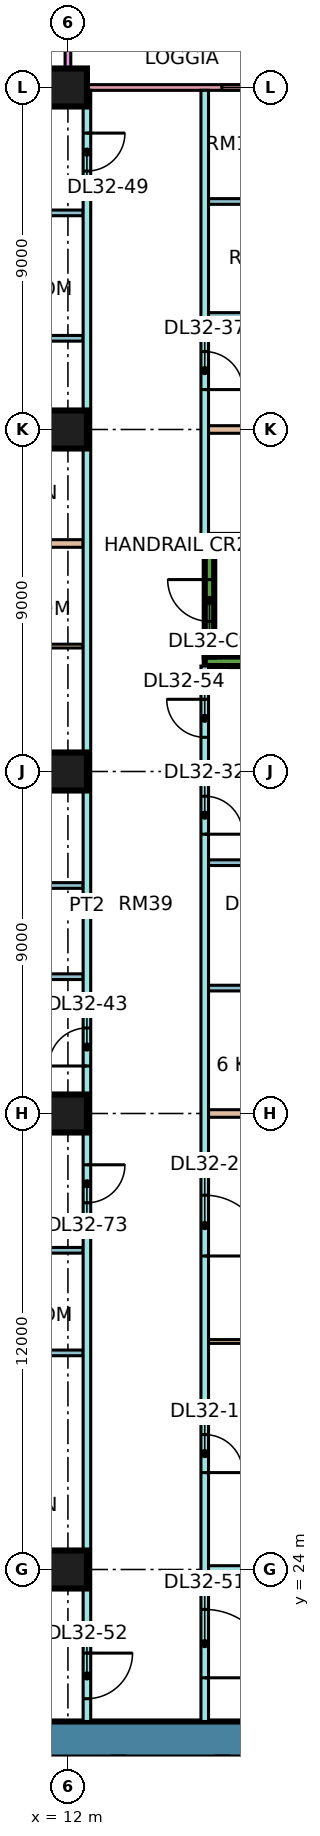
"""IFC4 building model, lengths in metres.
Left out: names, types, materials, properties, quantities, classifications, styles, units other than length and angle.
Written with IfcOpenShell. Run it as: python <this file> out.ifc"""

import sys

from ifc_helpers import new_model, si_unit, direction, frame, frame_2d, origin, origin_2d, place, context, subcontext, project, spatial, rectangle, extrude, element, fill, save


model = new_model("IFC4")
c1 = context("Model", 3, precision=1e-05, world=origin(), true_north=direction((0.0, 1.0)))
c2 = subcontext(c1, "Body", "Model", "MODEL_VIEW")
j1 = project(units=[si_unit("LENGTHUNIT", "METRE"), si_unit("PLANEANGLEUNIT", "RADIAN")], contexts=[c1])
p1 = place(None, origin())
s1 = spatial("IfcSite", under=j1, at=p1, CompositionType="ELEMENT")
p2 = place(p1, origin())
s2 = spatial("IfcBuilding", under=s1, at=p2, CompositionType="ELEMENT")
p3 = place(p2, frame((0.0, 0.0, 136.9)))
s3 = spatial("IfcBuildingStorey", under=s2, at=p3, CompositionType="ELEMENT", Elevation=136.9)
for number, where, z_axis, x_axis in (
    (1, (12.0, 24.0, 0.0), (0.0, 0.0, 1.0), (1.0, 0.0, 0.0)),
    (2, (12.0, 36.0, 0.0), (0.0, 0.0, 1.0), (1.0, 0.0, 0.0)),
    (3, (12.0, 45.0, 0.0), (0.0, 0.0, 1.0), (1.0, 0.0, 0.0)),
    (4, (12.0, 54.0, 0.0), (0.0, 0.0, 1.0), (1.0, 0.0, 0.0)),
    (5, (12.0, 63.0, 0.0), (0.0, 0.0, 1.0), (1.0, 0.0, 0.0)),
):
    element("IfcColumn", number, at=place(p3, frame(where, z_axis=z_axis, x_axis=x_axis)), inside=s3, PredefinedType="COLUMN", context=c2, shape_type="SweptSolid", body=[
        extrude(rectangle(XDim=1.0, YDim=1.0, at=origin_2d()), origin(), (0.0, 0.0, 1.0), 3.75),
    ])
p4 = place(p3, frame((9.0, 19.525, 0.0), z_axis=(0.0, 0.0, 1.0), x_axis=(1.0, 0.0, 0.0)))
e6 = element("IfcWall", 6, at=p4, inside=s3, PredefinedType="SHEAR", context=c2, shape_type="SweptSolid", body=[
    extrude(rectangle(XDim=25.0, YDim=0.95, at=frame_2d((12.5, 0.0))), origin(), (0.0, 0.0, 1.0), 3.75),
])
p5 = place(p4, frame((19.1, 0.0, 0.0)))
e7 = element("IfcOpeningElement", 7, at=p5, cuts=e6, PredefinedType="OPENING", context=c2, shape_type="SweptSolid", body=[
    extrude(rectangle(XDim=1.8, YDim=2.4, at=frame_2d((0.9, 1.2))), frame((0.0, 0.485, 0.0), z_axis=(0.0, -1.0, 0.0), x_axis=(1.0, 0.0, 0.0)), (0.0, 0.0, 1.0), 0.97),
])
for number, where, z_axis, x_axis in (
    (8, (15.6, 47.9, 0.0), (0.0, 0.0, 1.0), (1.0, 0.0, 0.0)),
    (9, (15.6, 51.1, 0.0), (0.0, 0.0, 1.0), (1.0, 0.0, 0.0)),
):
    element("IfcWall", number, at=place(p3, frame(where, z_axis=z_axis, x_axis=x_axis)), inside=s3, PredefinedType="SHEAR", context=c2, shape_type="SweptSolid", body=[
        extrude(rectangle(XDim=7.0, YDim=0.25, at=frame_2d((3.5, 0.0))), origin(), (0.0, 0.0, 1.0), 3.75),
    ])
p6 = place(p3, frame((15.725, 48.025, 0.0), z_axis=(0.0, 0.0, 1.0), x_axis=(0.0, 1.0, 0.0)))
e10 = element("IfcWall", 10, at=p6, inside=s3, PredefinedType="SHEAR", context=c2, shape_type="SweptSolid", body=[
    extrude(rectangle(XDim=2.95, YDim=0.25, at=frame_2d((1.475, 0.0))), origin(), (0.0, 0.0, 1.0), 3.75),
])
p7 = place(p6, frame((0.925, 0.0, 0.0)))
e11 = element("IfcOpeningElement", 11, at=p7, cuts=e10, PredefinedType="OPENING", context=c2, shape_type="SweptSolid", body=[
    extrude(rectangle(XDim=1.1, YDim=2.2, at=frame_2d((0.55, 1.1))), frame((0.0, 0.135, 0.0), z_axis=(0.0, -1.0, 0.0), x_axis=(1.0, 0.0, 0.0)), (0.0, 0.0, 1.0), 0.27),
])
p8 = place(p3, frame((22.425, 63.0, 0.0), z_axis=(0.0, 0.0, 1.0), x_axis=(-1.0, 0.0, 0.0)))
e12 = element("IfcWall", 12, at=p8, inside=s3, PredefinedType="SOLIDWALL", context=c2, shape_type="SweptSolid", body=[
    extrude(rectangle(XDim=10.35, YDim=0.15, at=frame_2d((5.175, 0.0))), origin(), (0.0, 0.0, 1.0), 3.3),
])
p9 = place(p8, frame((0.562, 0.0, 0.45)))
e13 = element("IfcOpeningElement", 13, at=p9, cuts=e12, PredefinedType="OPENING", context=c2, shape_type="SweptSolid", body=[
    extrude(rectangle(XDim=1.8, YDim=2.4, at=frame_2d((0.9, 1.2))), frame((0.0, 0.085, 0.0), z_axis=(0.0, -1.0, 0.0), x_axis=(1.0, 0.0, 0.0)), (0.0, 0.0, 1.0), 0.17),
])
p10 = place(p8, frame((4.575, 0.0, 0.45)))
e14 = element("IfcOpeningElement", 14, at=p10, cuts=e12, PredefinedType="OPENING", context=c2, shape_type="SweptSolid", body=[
    extrude(rectangle(XDim=1.8, YDim=2.4, at=frame_2d((0.9, 1.2))), frame((0.0, 0.085, 0.0), z_axis=(0.0, -1.0, 0.0), x_axis=(1.0, 0.0, 0.0)), (0.0, 0.0, 1.0), 0.17),
])
p11 = place(p3, frame((12.0, 64.5, 0.0), z_axis=(0.0, 0.0, 1.0), x_axis=(0.0, -1.0, 0.0)))
e15 = element("IfcWall", 15, at=p11, inside=s3, PredefinedType="SOLIDWALL", context=c2, shape_type="SweptSolid", body=[
    extrude(rectangle(XDim=1.5, YDim=0.15, at=frame_2d((0.75, 0.0))), origin(), (0.0, 0.0, 1.0), 3.3),
])
p12 = place(p3, frame((0.0, 36.0, 0.0), z_axis=(0.0, 0.0, 1.0), x_axis=(1.0, 0.0, 0.0)))
e16 = element("IfcWall", 16, at=p12, inside=s3, PredefinedType="PARTITIONING", context=c2, shape_type="SweptSolid", body=[
    extrude(rectangle(XDim=12.4, YDim=0.2, at=frame_2d((6.2, 0.0))), origin(), (0.0, 0.0, 1.0), 3.3),
])
p13 = place(p3, frame((-1.35, 51.0, 0.0), z_axis=(0.0, 0.0, 1.0), x_axis=(1.0, 0.0, 0.0)))
e17 = element("IfcWall", 17, at=p13, inside=s3, PredefinedType="PARTITIONING", context=c2, shape_type="SweptSolid", body=[
    extrude(rectangle(XDim=13.75, YDim=0.2, at=frame_2d((6.875, 0.0))), origin(), (0.0, 0.0, 1.0), 3.3),
])
p14 = place(p3, frame((0.074, 22.4, 0.0), z_axis=(0.0, 0.0, 1.0), x_axis=(1.0, 0.0, 0.0)))
e18 = element("IfcWall", 18, at=p14, inside=s3, PredefinedType="PARTITIONING", context=c2, shape_type="SweptSolid", body=[
    extrude(rectangle(XDim=12.326, YDim=0.2, at=frame_2d((6.163, 0.0))), origin(), (0.0, 0.0, 1.0), 3.3),
])
for number, where, z_axis, x_axis in (
    (19, (7.775, 39.6, 0.0), (0.0, 0.0, 1.0), (1.0, 0.0, 0.0)),
    (20, (7.775, 42.0, 0.0), (0.0, 0.0, 1.0), (1.0, 0.0, 0.0)),
):
    element("IfcWall", number, at=place(p3, frame(where, z_axis=z_axis, x_axis=x_axis)), inside=s3, PredefinedType="PARTITIONING", context=c2, shape_type="SweptSolid", body=[
        extrude(rectangle(XDim=4.625, YDim=0.15, at=frame_2d((2.312, 0.0))), origin(), (0.0, 0.0, 1.0), 3.3),
    ])
p15 = place(p3, frame((7.775, 48.3, 0.0), z_axis=(0.0, 0.0, 1.0), x_axis=(1.0, 0.0, 0.0)))
e21 = element("IfcWall", 21, at=p15, inside=s3, PredefinedType="PARTITIONING", context=c2, shape_type="SweptSolid", body=[
    extrude(rectangle(XDim=4.625, YDim=0.1, at=frame_2d((2.312, 0.0))), origin(), (0.0, 0.0, 1.0), 3.3),
])
for number, where, z_axis, x_axis in (
    (22, (8.375, 29.7, 0.0), (0.0, 0.0, 1.0), (1.0, 0.0, 0.0)),
    (23, (8.375, 32.4, 0.0), (0.0, 0.0, 1.0), (1.0, 0.0, 0.0)),
    (24, (8.375, 56.4, 0.0), (0.0, 0.0, 1.0), (1.0, 0.0, 0.0)),
):
    element("IfcWall", number, at=place(p3, frame(where, z_axis=z_axis, x_axis=x_axis)), inside=s3, PredefinedType="PARTITIONING", context=c2, shape_type="SweptSolid", body=[
        extrude(rectangle(XDim=4.025, YDim=0.15, at=frame_2d((2.012, 0.0))), origin(), (0.0, 0.0, 1.0), 3.3),
    ])
p16 = place(p3, frame((8.375, 59.7, 0.0), z_axis=(0.0, 0.0, 1.0), x_axis=(1.0, 0.0, 0.0)))
e25 = element("IfcWall", 25, at=p16, inside=s3, PredefinedType="PARTITIONING", context=c2, shape_type="SweptSolid", body=[
    extrude(rectangle(XDim=4.025, YDim=0.15, at=frame_2d((2.012, 0.0))), origin(), (0.0, 0.0, 1.0), 3.3),
])
p17 = place(p16, frame((1.575, 0.0, 0.0)))
e26 = element("IfcOpeningElement", 26, at=p17, cuts=e25, PredefinedType="OPENING", context=c2, shape_type="SweptSolid", body=[
    extrude(rectangle(XDim=0.8, YDim=2.1, at=frame_2d((0.4, 1.05))), frame((0.0, 0.085, 0.0), z_axis=(0.0, -1.0, 0.0), x_axis=(1.0, 0.0, 0.0)), (0.0, 0.0, 1.0), 0.17),
])
p18 = place(p3, frame((12.5, 20.0, 0.0), z_axis=(0.0, 0.0, 1.0), x_axis=(0.0, 1.0, 0.0)))
e27 = element("IfcWall", 27, at=p18, inside=s3, PredefinedType="PARTITIONING", context=c2, shape_type="SweptSolid", body=[
    extrude(rectangle(XDim=42.926, YDim=0.2, at=frame_2d((21.463, 0.0))), origin(), (0.0, 0.0, 1.0), 3.3),
])
p19 = place(p18, frame((17.25, 0.0, 0.0)))
e28 = element("IfcOpeningElement", 28, at=p19, cuts=e27, PredefinedType="OPENING", context=c2, shape_type="SweptSolid", body=[
    extrude(rectangle(XDim=1.0, YDim=2.1, at=frame_2d((0.5, 1.05))), frame((0.0, 0.11, 0.0), z_axis=(0.0, -1.0, 0.0), x_axis=(1.0, 0.0, 0.0)), (0.0, 0.0, 1.0), 0.22),
])
p20 = place(p18, frame((40.8, 0.0, 0.0)))
e29 = element("IfcOpeningElement", 29, at=p20, cuts=e27, PredefinedType="OPENING", context=c2, shape_type="SweptSolid", body=[
    extrude(rectangle(XDim=1.0, YDim=2.1, at=frame_2d((0.5, 1.05))), frame((0.0, 0.11, 0.0), z_axis=(0.0, -1.0, 0.0), x_axis=(1.0, 0.0, 0.0)), (0.0, 0.0, 1.0), 0.22),
])
p21 = place(p18, frame((0.6, 0.0, 0.0)))
e30 = element("IfcOpeningElement", 30, at=p21, cuts=e27, PredefinedType="OPENING", context=c2, shape_type="SweptSolid", body=[
    extrude(rectangle(XDim=1.2, YDim=2.1, at=frame_2d((0.6, 1.05))), frame((0.0, 0.11, 0.0), z_axis=(0.0, -1.0, 0.0), x_axis=(1.0, 0.0, 0.0)), (0.0, 0.0, 1.0), 0.22),
])
p22 = place(p18, frame((13.65, 0.0, 0.0)))
e31 = element("IfcOpeningElement", 31, at=p22, cuts=e27, PredefinedType="OPENING", context=c2, shape_type="SweptSolid", body=[
    extrude(rectangle(XDim=1.0, YDim=2.1, at=frame_2d((0.5, 1.05))), frame((0.0, 0.11, 0.0), z_axis=(0.0, -1.0, 0.0), x_axis=(1.0, 0.0, 0.0)), (0.0, 0.0, 1.0), 0.22),
])
p23 = place(p3, frame((15.6, 20.0, 0.0), z_axis=(0.0, 0.0, 1.0), x_axis=(0.0, 1.0, 0.0)))
e32 = element("IfcWall", 32, at=p23, inside=s3, PredefinedType="PARTITIONING", context=c2, shape_type="SweptSolid", body=[
    extrude(rectangle(XDim=27.775, YDim=0.2, at=frame_2d((13.887, 0.0))), origin(), (0.0, 0.0, 1.0), 3.3),
])
p24 = place(p23, frame((6.55, 0.0, 0.0)))
e33 = element("IfcOpeningElement", 33, at=p24, cuts=e32, PredefinedType="OPENING", context=c2, shape_type="SweptSolid", body=[
    extrude(rectangle(XDim=1.0, YDim=2.1, at=frame_2d((0.5, 1.05))), frame((0.0, 0.11, 0.0), z_axis=(0.0, -1.0, 0.0), x_axis=(1.0, 0.0, 0.0)), (0.0, 0.0, 1.0), 0.22),
])
p25 = place(p23, frame((12.25, 0.0, 0.0)))
e34 = element("IfcOpeningElement", 34, at=p25, cuts=e32, PredefinedType="OPENING", context=c2, shape_type="SweptSolid", body=[
    extrude(rectangle(XDim=1.6, YDim=2.1, at=frame_2d((0.8, 1.05))), frame((0.0, 0.11, 0.0), z_axis=(0.0, -1.0, 0.0), x_axis=(1.0, 0.0, 0.0)), (0.0, 0.0, 1.0), 0.22),
])
p26 = place(p23, frame((23.35, 0.0, 0.0)))
e35 = element("IfcOpeningElement", 35, at=p26, cuts=e32, PredefinedType="OPENING", context=c2, shape_type="SweptSolid", body=[
    extrude(rectangle(XDim=1.0, YDim=2.1, at=frame_2d((0.5, 1.05))), frame((0.0, 0.11, 0.0), z_axis=(0.0, -1.0, 0.0), x_axis=(1.0, 0.0, 0.0)), (0.0, 0.0, 1.0), 0.22),
])
p27 = place(p23, frame((1.15, 0.0, 0.0)))
e36 = element("IfcOpeningElement", 36, at=p27, cuts=e32, PredefinedType="OPENING", context=c2, shape_type="SweptSolid", body=[
    extrude(rectangle(XDim=1.8, YDim=2.1, at=frame_2d((0.9, 1.05))), frame((0.0, 0.11, 0.0), z_axis=(0.0, -1.0, 0.0), x_axis=(1.0, 0.0, 0.0)), (0.0, 0.0, 1.0), 0.22),
])
p28 = place(p23, frame((25.9, 0.0, 0.0)))
e37 = element("IfcOpeningElement", 37, at=p28, cuts=e32, PredefinedType="OPENING", context=c2, shape_type="SweptSolid", body=[
    extrude(rectangle(XDim=1.0, YDim=2.1, at=frame_2d((0.5, 1.05))), frame((0.0, 0.11, 0.0), z_axis=(0.0, -1.0, 0.0), x_axis=(1.0, 0.0, 0.0)), (0.0, 0.0, 1.0), 0.22),
])
p29 = place(p3, frame((15.6, 51.225, 0.0), z_axis=(0.0, 0.0, 1.0), x_axis=(0.0, 1.0, 0.0)))
e38 = element("IfcWall", 38, at=p29, inside=s3, PredefinedType="PARTITIONING", context=c2, shape_type="SweptSolid", body=[
    extrude(rectangle(XDim=11.701, YDim=0.2, at=frame_2d((5.851, 0.0))), origin(), (0.0, 0.0, 1.0), 3.3),
])
p30 = place(p29, frame((3.825, 0.0, 0.0)))
e39 = element("IfcOpeningElement", 39, at=p30, cuts=e38, PredefinedType="OPENING", context=c2, shape_type="SweptSolid", body=[
    extrude(rectangle(XDim=1.0, YDim=2.1, at=frame_2d((0.5, 1.05))), frame((0.0, 0.11, 0.0), z_axis=(0.0, -1.0, 0.0), x_axis=(1.0, 0.0, 0.0)), (0.0, 0.0, 1.0), 0.22),
])
p31 = place(p3, frame((15.7, 24.0, 0.0), z_axis=(0.0, 0.0, 1.0), x_axis=(1.0, 0.0, 0.0)))
e40 = element("IfcWall", 40, at=p31, inside=s3, PredefinedType="PARTITIONING", context=c2, shape_type="SweptSolid", body=[
    extrude(rectangle(XDim=5.8, YDim=0.2, at=frame_2d((2.9, 0.0))), origin(), (0.0, 0.0, 1.0), 3.3),
])
p32 = place(p3, frame((15.7, 30.0, 0.0), z_axis=(0.0, 0.0, 1.0), x_axis=(1.0, 0.0, 0.0)))
e41 = element("IfcWall", 41, at=p32, inside=s3, PredefinedType="PARTITIONING", context=c2, shape_type="SweptSolid", body=[
    extrude(rectangle(XDim=5.8, YDim=0.1, at=frame_2d((2.9, 0.0))), origin(), (0.0, 0.0, 1.0), 3.3),
])
p33 = place(p3, frame((15.7, 36.0, 0.0), z_axis=(0.0, 0.0, 1.0), x_axis=(1.0, 0.0, 0.0)))
e42 = element("IfcWall", 42, at=p33, inside=s3, PredefinedType="PARTITIONING", context=c2, shape_type="SweptSolid", body=[
    extrude(rectangle(XDim=8.3, YDim=0.2, at=frame_2d((4.15, 0.0))), origin(), (0.0, 0.0, 1.0), 3.3),
])
p34 = place(p3, frame((15.7, 39.3, 0.0), z_axis=(0.0, 0.0, 1.0), x_axis=(1.0, 0.0, 0.0)))
e43 = element("IfcWall", 43, at=p34, inside=s3, PredefinedType="PARTITIONING", context=c2, shape_type="SweptSolid", body=[
    extrude(rectangle(XDim=3.125, YDim=0.15, at=frame_2d((1.562, 0.0))), origin(), (0.0, 0.0, 1.0), 3.3),
])
p35 = place(p3, frame((15.7, 42.6, 0.0), z_axis=(0.0, 0.0, 1.0), x_axis=(1.0, 0.0, 0.0)))
e44 = element("IfcWall", 44, at=p35, inside=s3, PredefinedType="PARTITIONING", context=c2, shape_type="SweptSolid", body=[
    extrude(rectangle(XDim=3.125, YDim=0.15, at=frame_2d((1.562, 0.0))), origin(), (0.0, 0.0, 1.0), 3.3),
])
p36 = place(p35, frame((1.1, 0.0, 0.0)))
e45 = element("IfcOpeningElement", 45, at=p36, cuts=e44, PredefinedType="OPENING", context=c2, shape_type="SweptSolid", body=[
    extrude(rectangle(XDim=0.8, YDim=2.1, at=frame_2d((0.4, 1.05))), frame((0.0, 0.085, 0.0), z_axis=(0.0, -1.0, 0.0), x_axis=(1.0, 0.0, 0.0)), (0.0, 0.0, 1.0), 0.17),
])
p37 = place(p3, frame((15.7, 45.0, 0.0), z_axis=(0.0, 0.0, 1.0), x_axis=(1.0, 0.0, 0.0)))
e46 = element("IfcWall", 46, at=p37, inside=s3, PredefinedType="PARTITIONING", context=c2, shape_type="SweptSolid", body=[
    extrude(rectangle(XDim=8.226, YDim=0.2, at=frame_2d((4.113, 0.0))), origin(), (0.0, 0.0, 1.0), 3.3),
])
p38 = place(p3, frame((15.7, 54.0, 0.0), z_axis=(0.0, 0.0, 1.0), x_axis=(1.0, 0.0, 0.0)))
e47 = element("IfcWall", 47, at=p38, inside=s3, PredefinedType="PARTITIONING", context=c2, shape_type="SweptSolid", body=[
    extrude(rectangle(XDim=8.3, YDim=0.2, at=frame_2d((4.15, 0.0))), origin(), (0.0, 0.0, 1.0), 3.3),
])
for number, where, z_axis, x_axis in (
    (48, (15.7, 57.0, 0.0), (0.0, 0.0, 1.0), (1.0, 0.0, 0.0)),
    (49, (15.7, 60.0, 0.0), (0.0, 0.0, 1.0), (1.0, 0.0, 0.0)),
):
    element("IfcWall", number, at=place(p3, frame(where, z_axis=z_axis, x_axis=x_axis)), inside=s3, PredefinedType="PARTITIONING", context=c2, shape_type="SweptSolid", body=[
        extrude(rectangle(XDim=2.525, YDim=0.15, at=frame_2d((1.263, 0.0))), origin(), (0.0, 0.0, 1.0), 3.3),
    ])
p39 = place(p10, origin())
e50 = element("IfcWindow", 50, at=p39, inside=s3, PartitioningType="SINGLE_PANEL", PredefinedType="WINDOW", context=c2, shape_type="SweptSolid", body=[
    extrude(rectangle(XDim=1.8, YDim=2.4, at=frame_2d((0.9, 1.2))), frame((0.0, 0.03, 0.0), z_axis=(0.0, -1.0, 0.0), x_axis=(1.0, 0.0, 0.0)), (0.0, 0.0, 1.0), 0.06),
])
fill(e14, e50)
p40 = place(p7, frame((1.1, 0.0, 0.0), z_axis=(0.0, 0.0, 1.0), x_axis=(-1.0, 0.0, 0.0)))
e51 = element("IfcDoor", 51, at=p40, inside=s3, OperationType="SINGLE_SWING_RIGHT", PredefinedType="DOOR", context=c2, shape_type="SweptSolid", body=[
    extrude(rectangle(XDim=1.1, YDim=2.2, at=frame_2d((0.55, 1.1))), frame((0.0, 0.025, 0.0), z_axis=(0.0, -1.0, 0.0), x_axis=(1.0, 0.0, 0.0)), (0.0, 0.0, 1.0), 0.05),
])
fill(e11, e51)
p41 = place(p24, frame((1.0, 0.0, 0.0), z_axis=(0.0, 0.0, 1.0), x_axis=(-1.0, 0.0, 0.0)))
e52 = element("IfcDoor", 52, at=p41, inside=s3, OperationType="SINGLE_SWING_LEFT", PredefinedType="DOOR", context=c2, shape_type="SweptSolid", body=[
    extrude(rectangle(XDim=1.0, YDim=2.1, at=frame_2d((0.5, 1.05))), frame((0.0, 0.025, 0.0), z_axis=(0.0, -1.0, 0.0), x_axis=(1.0, 0.0, 0.0)), (0.0, 0.0, 1.0), 0.05),
])
fill(e33, e52)
p42 = place(p25, frame((1.6, 0.0, 0.0), z_axis=(0.0, 0.0, 1.0), x_axis=(-1.0, 0.0, 0.0)))
e53 = element("IfcDoor", 53, at=p42, inside=s3, OperationType="DOUBLE_DOOR_SINGLE_SWING", PredefinedType="DOOR", context=c2, shape_type="SweptSolid", body=[
    extrude(rectangle(XDim=1.6, YDim=2.1, at=frame_2d((0.8, 1.05))), frame((0.0, 0.025, 0.0), z_axis=(0.0, -1.0, 0.0), x_axis=(1.0, 0.0, 0.0)), (0.0, 0.0, 1.0), 0.05),
])
fill(e34, e53)
p43 = place(p26, frame((1.0, 0.0, 0.0), z_axis=(0.0, 0.0, 1.0), x_axis=(-1.0, 0.0, 0.0)))
e54 = element("IfcDoor", 54, at=p43, inside=s3, OperationType="SINGLE_SWING_LEFT", PredefinedType="DOOR", context=c2, shape_type="SweptSolid", body=[
    extrude(rectangle(XDim=1.0, YDim=2.1, at=frame_2d((0.5, 1.05))), frame((0.0, 0.025, 0.0), z_axis=(0.0, -1.0, 0.0), x_axis=(1.0, 0.0, 0.0)), (0.0, 0.0, 1.0), 0.05),
])
fill(e35, e54)
p44 = place(p30, frame((1.0, 0.0, 0.0), z_axis=(0.0, 0.0, 1.0), x_axis=(-1.0, 0.0, 0.0)))
e55 = element("IfcDoor", 55, at=p44, inside=s3, OperationType="SINGLE_SWING_LEFT", PredefinedType="DOOR", context=c2, shape_type="SweptSolid", body=[
    extrude(rectangle(XDim=1.0, YDim=2.1, at=frame_2d((0.5, 1.05))), frame((0.0, 0.025, 0.0), z_axis=(0.0, -1.0, 0.0), x_axis=(1.0, 0.0, 0.0)), (0.0, 0.0, 1.0), 0.05),
])
fill(e39, e55)
p45 = place(p19, origin())
e56 = element("IfcDoor", 56, at=p45, inside=s3, OperationType="SINGLE_SWING_LEFT", PredefinedType="DOOR", context=c2, shape_type="SweptSolid", body=[
    extrude(rectangle(XDim=1.0, YDim=2.1, at=frame_2d((0.5, 1.05))), frame((0.0, 0.025, 0.0), z_axis=(0.0, -1.0, 0.0), x_axis=(1.0, 0.0, 0.0)), (0.0, 0.0, 1.0), 0.05),
])
fill(e28, e56)
p46 = place(p20, origin())
e57 = element("IfcDoor", 57, at=p46, inside=s3, OperationType="SINGLE_SWING_RIGHT", PredefinedType="DOOR", context=c2, shape_type="SweptSolid", body=[
    extrude(rectangle(XDim=1.0, YDim=2.1, at=frame_2d((0.5, 1.05))), frame((0.0, 0.025, 0.0), z_axis=(0.0, -1.0, 0.0), x_axis=(1.0, 0.0, 0.0)), (0.0, 0.0, 1.0), 0.05),
])
fill(e29, e57)
p47 = place(p27, frame((1.8, 0.0, 0.0), z_axis=(0.0, 0.0, 1.0), x_axis=(-1.0, 0.0, 0.0)))
e58 = element("IfcDoor", 58, at=p47, inside=s3, OperationType="DOUBLE_DOOR_SINGLE_SWING", PredefinedType="DOOR", context=c2, shape_type="SweptSolid", body=[
    extrude(rectangle(XDim=1.8, YDim=2.1, at=frame_2d((0.9, 1.05))), frame((0.0, 0.025, 0.0), z_axis=(0.0, -1.0, 0.0), x_axis=(1.0, 0.0, 0.0)), (0.0, 0.0, 1.0), 0.05),
])
fill(e36, e58)
p48 = place(p21, origin())
e59 = element("IfcDoor", 59, at=p48, inside=s3, OperationType="SINGLE_SWING_RIGHT", PredefinedType="DOOR", context=c2, shape_type="SweptSolid", body=[
    extrude(rectangle(XDim=1.2, YDim=2.1, at=frame_2d((0.6, 1.05))), frame((0.0, 0.025, 0.0), z_axis=(0.0, -1.0, 0.0), x_axis=(1.0, 0.0, 0.0)), (0.0, 0.0, 1.0), 0.05),
])
fill(e30, e59)
p49 = place(p28, frame((1.0, 0.0, 0.0), z_axis=(0.0, 0.0, 1.0), x_axis=(-1.0, 0.0, 0.0)))
e60 = element("IfcDoor", 60, at=p49, inside=s3, OperationType="SINGLE_SWING_RIGHT", PredefinedType="DOOR", context=c2, shape_type="SweptSolid", body=[
    extrude(rectangle(XDim=1.0, YDim=2.1, at=frame_2d((0.5, 1.05))), frame((0.0, 0.025, 0.0), z_axis=(0.0, -1.0, 0.0), x_axis=(1.0, 0.0, 0.0)), (0.0, 0.0, 1.0), 0.05),
])
fill(e37, e60)
p50 = place(p22, origin())
e61 = element("IfcDoor", 61, at=p50, inside=s3, OperationType="SINGLE_SWING_RIGHT", PredefinedType="DOOR", context=c2, shape_type="SweptSolid", body=[
    extrude(rectangle(XDim=1.0, YDim=2.1, at=frame_2d((0.5, 1.05))), frame((0.0, 0.025, 0.0), z_axis=(0.0, -1.0, 0.0), x_axis=(1.0, 0.0, 0.0)), (0.0, 0.0, 1.0), 0.05),
])
fill(e31, e61)
save(model, sys.argv[1])
